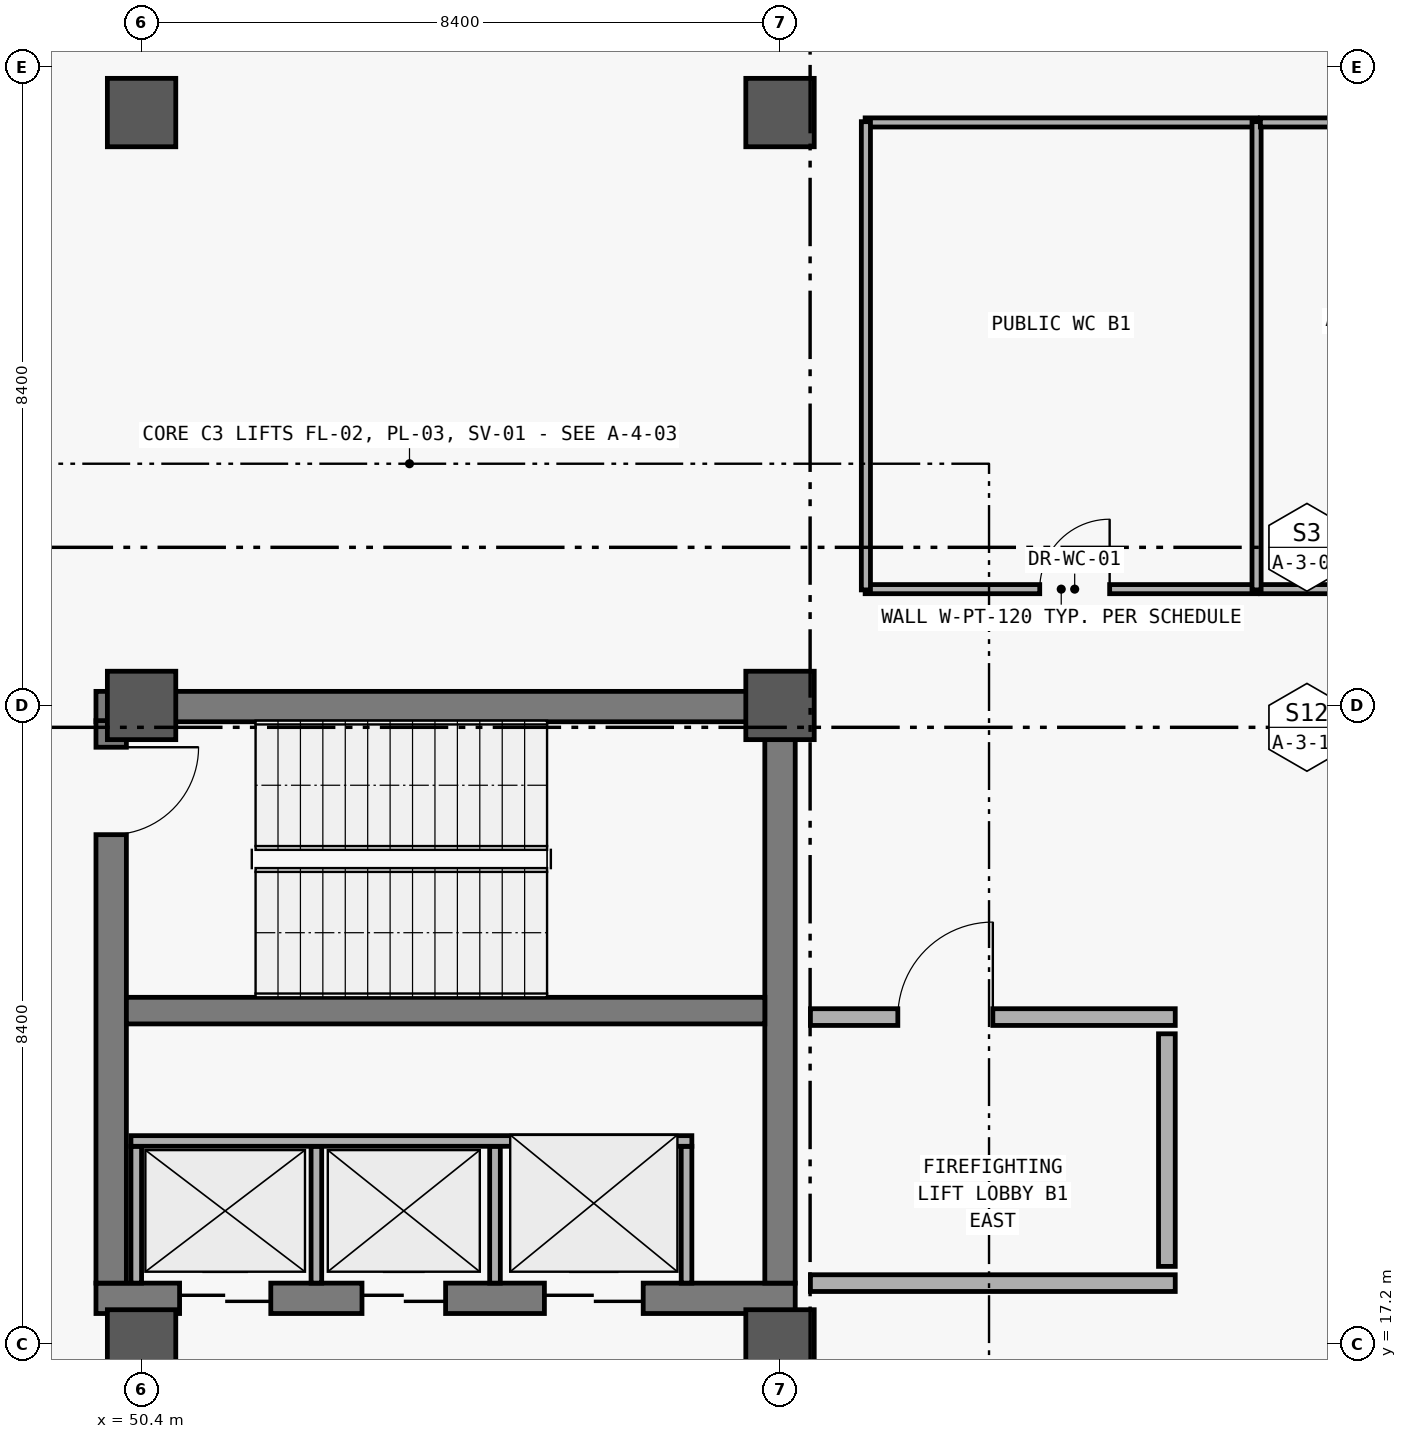
"""IFC4 building model, lengths in metres.
Left out: names, types, materials, properties, quantities, classifications, styles, units other than length and angle.
Written with IfcOpenShell. Run it as: python <this file> out.ifc"""

import sys

from ifc_helpers import new_model, si_unit, direction, frame, frame_2d, origin, origin_2d, place, context, subcontext, project, spatial, rectangle, extrude, element, fill, save


model = new_model("IFC4")
c1 = context("Model", 3, precision=1e-05, world=origin(), true_north=direction((0.0, 1.0)))
c2 = subcontext(c1, "Body", "Model", "MODEL_VIEW")
j1 = project(units=[si_unit("LENGTHUNIT", "METRE"), si_unit("PLANEANGLEUNIT", "RADIAN")], contexts=[c1])
p1 = place(None, origin())
s1 = spatial("IfcSite", under=j1, at=p1, CompositionType="ELEMENT")
p2 = place(p1, origin())
s2 = spatial("IfcBuilding", under=s1, at=p2, CompositionType="ELEMENT")
p3 = place(p2, frame((0.0, 0.0, -4.8)))
s3 = spatial("IfcBuildingStorey", under=s2, at=p3, CompositionType="ELEMENT", Elevation=-4.8)
for number, where, z_axis, x_axis in (
    (1, (50.4, 17.2, 0.0), (0.0, 0.0, 1.0), (1.0, 0.0, 0.0)),
    (2, (50.4, 25.6, 0.0), (0.0, 0.0, 1.0), (1.0, 0.0, 0.0)),
    (3, (50.4, 33.4, 0.0), (0.0, 0.0, 1.0), (1.0, 0.0, 0.0)),
    (4, (58.8, 17.2, 0.0), (0.0, 0.0, 1.0), (1.0, 0.0, 0.0)),
    (5, (58.8, 25.6, 0.0), (0.0, 0.0, 1.0), (1.0, 0.0, 0.0)),
    (6, (58.8, 33.4, 0.0), (0.0, 0.0, 1.0), (1.0, 0.0, 0.0)),
):
    element("IfcColumn", number, at=place(p3, frame(where, z_axis=z_axis, x_axis=x_axis)), inside=s3, PredefinedType="COLUMN", context=c2, shape_type="SweptSolid", body=[
        extrude(rectangle(XDim=0.9, YDim=0.9, at=origin_2d()), origin(), (0.0, 0.0, 1.0), 4.8),
    ])
p4 = place(p3, frame((49.8, 17.8, 0.0), z_axis=(0.0, 0.0, 1.0), x_axis=(1.0, 0.0, 0.0)))
e7 = element("IfcWall", 7, at=p4, inside=s3, PredefinedType="SHEAR", context=c2, shape_type="SweptSolid", body=[
    extrude(rectangle(XDim=9.2, YDim=0.4, at=frame_2d((4.6, 0.0))), origin(), (0.0, 0.0, 1.0), 4.48),
])
p5 = place(p4, frame((1.1, 0.0, 0.0)))
e8 = element("IfcOpeningElement", 8, at=p5, cuts=e7, PredefinedType="OPENING", context=c2, shape_type="SweptSolid", body=[
    extrude(rectangle(XDim=1.2, YDim=2.2, at=frame_2d((0.6, 1.1))), frame((0.0, 0.21, 0.0), z_axis=(0.0, -1.0, 0.0), x_axis=(1.0, 0.0, 0.0)), (0.0, 0.0, 1.0), 0.42),
])
p6 = place(p4, frame((3.5, 0.0, 0.0)))
e9 = element("IfcOpeningElement", 9, at=p6, cuts=e7, PredefinedType="OPENING", context=c2, shape_type="SweptSolid", body=[
    extrude(rectangle(XDim=1.1, YDim=2.2, at=frame_2d((0.55, 1.1))), frame((0.0, 0.21, 0.0), z_axis=(0.0, -1.0, 0.0), x_axis=(1.0, 0.0, 0.0)), (0.0, 0.0, 1.0), 0.42),
])
p7 = place(p4, frame((5.9, 0.0, 0.0)))
e10 = element("IfcOpeningElement", 10, at=p7, cuts=e7, PredefinedType="OPENING", context=c2, shape_type="SweptSolid", body=[
    extrude(rectangle(XDim=1.3, YDim=2.3, at=frame_2d((0.65, 1.15))), frame((0.0, 0.21, 0.0), z_axis=(0.0, -1.0, 0.0), x_axis=(1.0, 0.0, 0.0)), (0.0, 0.0, 1.0), 0.42),
])
p8 = place(p3, frame((59.0, 25.585, 0.0), z_axis=(0.0, 0.0, 1.0), x_axis=(-1.0, 0.0, 0.0)))
e11 = element("IfcWall", 11, at=p8, inside=s3, PredefinedType="SHEAR", context=c2, shape_type="SweptSolid", body=[
    extrude(rectangle(XDim=9.2, YDim=0.4, at=frame_2d((4.6, 0.0))), origin(), (0.0, 0.0, 1.0), 4.48),
])
p9 = place(p3, frame((50.0, 25.4, 0.0), z_axis=(0.0, 0.0, 1.0), x_axis=(0.0, -1.0, 0.0)))
e12 = element("IfcWall", 12, at=p9, inside=s3, PredefinedType="SHEAR", context=c2, shape_type="SweptSolid", body=[
    extrude(rectangle(XDim=7.4, YDim=0.4, at=frame_2d((3.7, 0.0))), origin(), (0.0, 0.0, 1.0), 4.48),
])
p10 = place(p9, frame((0.35, 0.0, 0.0)))
e13 = element("IfcOpeningElement", 13, at=p10, cuts=e12, PredefinedType="OPENING", context=c2, shape_type="SweptSolid", body=[
    extrude(rectangle(XDim=1.15, YDim=2.2, at=frame_2d((0.575, 1.1))), frame((0.0, 0.21, 0.0), z_axis=(0.0, -1.0, 0.0), x_axis=(1.0, 0.0, 0.0)), (0.0, 0.0, 1.0), 0.42),
])
p11 = place(p3, frame((58.8, 18.0, 0.0), z_axis=(0.0, 0.0, 1.0), x_axis=(0.0, 1.0, 0.0)))
e14 = element("IfcWall", 14, at=p11, inside=s3, PredefinedType="SHEAR", context=c2, shape_type="SweptSolid", body=[
    extrude(rectangle(XDim=7.4, YDim=0.4, at=frame_2d((3.7, 0.0))), origin(), (0.0, 0.0, 1.0), 4.48),
])
p12 = place(p3, frame((50.2, 21.585, 0.0), z_axis=(0.0, 0.0, 1.0), x_axis=(1.0, 0.0, 0.0)))
e15 = element("IfcWall", 15, at=p12, inside=s3, PredefinedType="SHEAR", context=c2, shape_type="SweptSolid", body=[
    extrude(rectangle(XDim=8.4, YDim=0.35, at=frame_2d((4.2, 0.0))), origin(), (0.0, 0.0, 1.0), 4.48),
])
for number, where, z_axis, x_axis in (
    (16, (50.33, 18.0, 0.0), (0.0, 0.0, 1.0), (0.0, 1.0, 0.0)),
    (17, (52.7, 18.0, 0.0), (0.0, 0.0, 1.0), (0.0, 1.0, 0.0)),
    (18, (55.05, 18.0, 0.0), (0.0, 0.0, 1.0), (0.0, 1.0, 0.0)),
    (19, (57.57, 18.0, 0.0), (0.0, 0.0, 1.0), (0.0, 1.0, 0.0)),
):
    element("IfcWall", number, at=place(p3, frame(where, z_axis=z_axis, x_axis=x_axis)), inside=s3, PredefinedType="PARTITIONING", context=c2, shape_type="SweptSolid", body=[
        extrude(rectangle(XDim=1.8, YDim=0.14, at=frame_2d((0.9, 0.0))), origin(), (0.0, 0.0, 1.0), 3.63),
    ])
p13 = place(p3, frame((50.26, 19.87, 0.0), z_axis=(0.0, 0.0, 1.0), x_axis=(1.0, 0.0, 0.0)))
e20 = element("IfcWall", 20, at=p13, inside=s3, PredefinedType="PARTITIONING", context=c2, shape_type="SweptSolid", body=[
    extrude(rectangle(XDim=7.38, YDim=0.14, at=frame_2d((3.69, 0.0))), origin(), (0.0, 0.0, 1.0), 3.63),
])
p14 = place(p3, frame((59.2, 18.0, 0.0), z_axis=(0.0, 0.0, 1.0), x_axis=(1.0, 0.0, 0.0)))
e21 = element("IfcWall", 21, at=p14, inside=s3, PredefinedType="SOLIDWALL", context=c2, shape_type="SweptSolid", body=[
    extrude(rectangle(XDim=4.8, YDim=0.22, at=frame_2d((2.4, 0.0))), origin(), (0.0, 0.0, 1.0), 3.63),
])
p15 = place(p3, frame((59.2, 21.5, 0.0), z_axis=(0.0, 0.0, 1.0), x_axis=(1.0, 0.0, 0.0)))
e22 = element("IfcWall", 22, at=p15, inside=s3, PredefinedType="SOLIDWALL", context=c2, shape_type="SweptSolid", body=[
    extrude(rectangle(XDim=4.8, YDim=0.22, at=frame_2d((2.4, 0.0))), origin(), (0.0, 0.0, 1.0), 3.63),
])
p16 = place(p15, frame((1.15, 0.0, 0.0)))
e23 = element("IfcOpeningElement", 23, at=p16, cuts=e22, PredefinedType="OPENING", context=c2, shape_type="SweptSolid", body=[
    extrude(rectangle(XDim=1.25, YDim=2.2, at=frame_2d((0.625, 1.1))), frame((0.0, 0.12, 0.0), z_axis=(0.0, -1.0, 0.0), x_axis=(1.0, 0.0, 0.0)), (0.0, 0.0, 1.0), 0.24),
])
p17 = place(p3, frame((63.89, 18.22, 0.0), z_axis=(0.0, 0.0, 1.0), x_axis=(0.0, 1.0, 0.0)))
e24 = element("IfcWall", 24, at=p17, inside=s3, PredefinedType="SOLIDWALL", context=c2, shape_type="SweptSolid", body=[
    extrude(rectangle(XDim=3.06, YDim=0.22, at=frame_2d((1.53, 0.0))), origin(), (0.0, 0.0, 1.0), 3.63),
])
p18 = place(p3, frame((59.92, 27.13, 0.0), z_axis=(0.0, 0.0, 1.0), x_axis=(1.0, 0.0, 0.0)))
e25 = element("IfcWall", 25, at=p18, inside=s3, PredefinedType="PARTITIONING", context=c2, shape_type="SweptSolid", body=[
    extrude(rectangle(XDim=5.16, YDim=0.12, at=frame_2d((2.58, 0.0))), origin(), (0.0, 0.0, 1.0), 3.58),
])
p19 = place(p18, frame((2.297, 0.0, 0.0)))
e26 = element("IfcOpeningElement", 26, at=p19, cuts=e25, PredefinedType="OPENING", context=c2, shape_type="SweptSolid", body=[
    extrude(rectangle(XDim=0.92, YDim=2.15, at=frame_2d((0.46, 1.075))), frame((0.0, 0.07, 0.0), z_axis=(0.0, -1.0, 0.0), x_axis=(1.0, 0.0, 0.0)), (0.0, 0.0, 1.0), 0.14),
])
p20 = place(p3, frame((65.12, 27.13, 0.0), z_axis=(0.0, 0.0, 1.0), x_axis=(1.0, 0.0, 0.0)))
e27 = element("IfcWall", 27, at=p20, inside=s3, PredefinedType="PARTITIONING", context=c2, shape_type="SweptSolid", body=[
    extrude(rectangle(XDim=4.16, YDim=0.12, at=frame_2d((2.08, 0.0))), origin(), (0.0, 0.0, 1.0), 3.58),
])
p21 = place(p20, frame((2.44, 0.0, 0.0)))
e28 = element("IfcOpeningElement", 28, at=p21, cuts=e27, PredefinedType="OPENING", context=c2, shape_type="SweptSolid", body=[
    extrude(rectangle(XDim=1.04, YDim=2.15, at=frame_2d((0.52, 1.075))), frame((0.0, 0.07, 0.0), z_axis=(0.0, -1.0, 0.0), x_axis=(1.0, 0.0, 0.0)), (0.0, 0.0, 1.0), 0.14),
])
p22 = place(p3, frame((59.92, 33.27, 0.0), z_axis=(0.0, 0.0, 1.0), x_axis=(1.0, 0.0, 0.0)))
e29 = element("IfcWall", 29, at=p22, inside=s3, PredefinedType="PARTITIONING", context=c2, shape_type="SweptSolid", body=[
    extrude(rectangle(XDim=5.16, YDim=0.12, at=frame_2d((2.58, 0.0))), origin(), (0.0, 0.0, 1.0), 3.58),
])
for number, where, z_axis, x_axis in (
    (30, (59.93, 27.12, 0.0), (0.0, 0.0, 1.0), (0.0, 1.0, 0.0)),
    (31, (65.07, 27.12, 0.0), (0.0, 0.0, 1.0), (0.0, 1.0, 0.0)),
):
    element("IfcWall", number, at=place(p3, frame(where, z_axis=z_axis, x_axis=x_axis)), inside=s3, PredefinedType="PARTITIONING", context=c2, shape_type="SweptSolid", body=[
        extrude(rectangle(XDim=6.16, YDim=0.12, at=frame_2d((3.08, 0.0))), origin(), (0.0, 0.0, 1.0), 3.58),
    ])
p23 = place(p3, frame((65.12, 33.27, 0.0), z_axis=(0.0, 0.0, 1.0), x_axis=(1.0, 0.0, 0.0)))
e32 = element("IfcWall", 32, at=p23, inside=s3, PredefinedType="PARTITIONING", context=c2, shape_type="SweptSolid", body=[
    extrude(rectangle(XDim=4.16, YDim=0.12, at=frame_2d((2.08, 0.0))), origin(), (0.0, 0.0, 1.0), 3.58),
])
p24 = place(p10, origin())
e33 = element("IfcDoor", 33, at=p24, inside=s3, OperationType="SINGLE_SWING_LEFT", PredefinedType="DOOR", context=c2, shape_type="SweptSolid", body=[
    extrude(rectangle(XDim=1.15, YDim=2.2, at=frame_2d((0.575, 1.1))), frame((0.0, 0.025, 0.0), z_axis=(0.0, -1.0, 0.0), x_axis=(1.0, 0.0, 0.0)), (0.0, 0.0, 1.0), 0.05),
])
fill(e13, e33)
p25 = place(p5, origin())
e34 = element("IfcDoor", 34, at=p25, inside=s3, OperationType="DOUBLE_DOOR_SLIDING", PredefinedType="DOOR", context=c2, shape_type="SweptSolid", body=[
    extrude(rectangle(XDim=1.2, YDim=2.2, at=frame_2d((0.6, 1.1))), frame((0.0, 0.025, 0.0), z_axis=(0.0, -1.0, 0.0), x_axis=(1.0, 0.0, 0.0)), (0.0, 0.0, 1.0), 0.05),
])
fill(e8, e34)
p26 = place(p6, origin())
e35 = element("IfcDoor", 35, at=p26, inside=s3, OperationType="DOUBLE_DOOR_SLIDING", PredefinedType="DOOR", context=c2, shape_type="SweptSolid", body=[
    extrude(rectangle(XDim=1.1, YDim=2.2, at=frame_2d((0.55, 1.1))), frame((0.0, 0.025, 0.0), z_axis=(0.0, -1.0, 0.0), x_axis=(1.0, 0.0, 0.0)), (0.0, 0.0, 1.0), 0.05),
])
fill(e9, e35)
p27 = place(p7, origin())
e36 = element("IfcDoor", 36, at=p27, inside=s3, OperationType="DOUBLE_DOOR_SLIDING", PredefinedType="DOOR", context=c2, shape_type="SweptSolid", body=[
    extrude(rectangle(XDim=1.3, YDim=2.3, at=frame_2d((0.65, 1.15))), frame((0.0, 0.025, 0.0), z_axis=(0.0, -1.0, 0.0), x_axis=(1.0, 0.0, 0.0)), (0.0, 0.0, 1.0), 0.05),
])
fill(e10, e36)
p28 = place(p16, origin())
e37 = element("IfcDoor", 37, at=p28, inside=s3, OperationType="SINGLE_SWING_RIGHT", PredefinedType="DOOR", context=c2, shape_type="SweptSolid", body=[
    extrude(rectangle(XDim=1.25, YDim=2.2, at=frame_2d((0.625, 1.1))), frame((0.0, 0.025, 0.0), z_axis=(0.0, -1.0, 0.0), x_axis=(1.0, 0.0, 0.0)), (0.0, 0.0, 1.0), 0.05),
])
fill(e23, e37)
p29 = place(p19, origin())
e38 = element("IfcDoor", 38, at=p29, inside=s3, OperationType="SINGLE_SWING_RIGHT", PredefinedType="DOOR", context=c2, shape_type="SweptSolid", body=[
    extrude(rectangle(XDim=0.92, YDim=2.15, at=frame_2d((0.46, 1.075))), frame((0.0, 0.025, 0.0), z_axis=(0.0, -1.0, 0.0), x_axis=(1.0, 0.0, 0.0)), (0.0, 0.0, 1.0), 0.05),
])
fill(e26, e38)
save(model, sys.argv[1])
